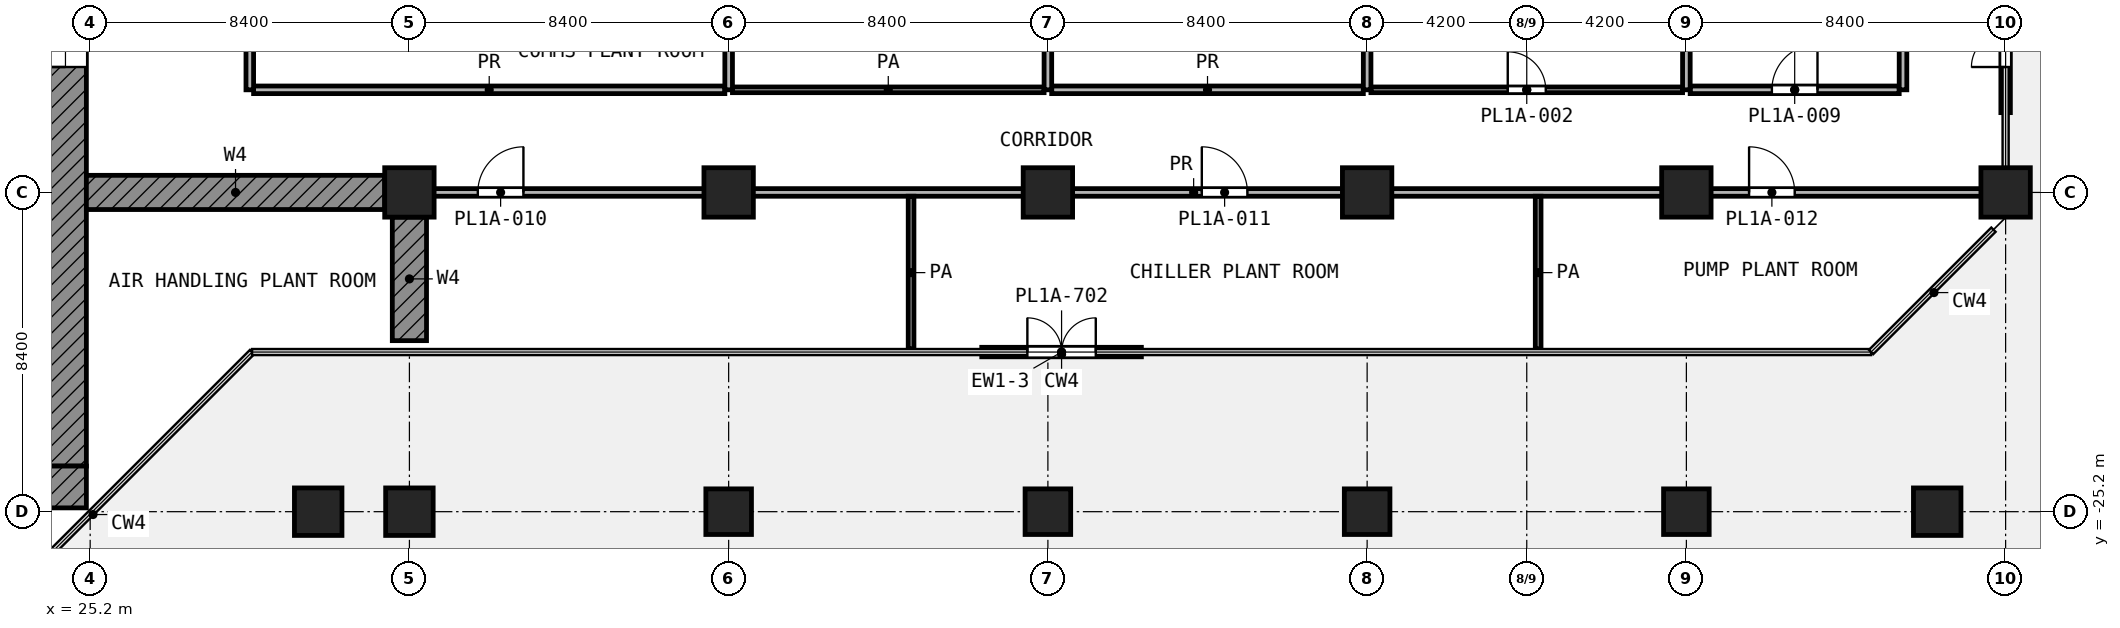
"""IFC4 building model, lengths in metres.
Left out: names, types, materials, properties, quantities, classifications, styles, units other than length and angle.
Written with IfcOpenShell. Run it as: python <this file> out.ifc"""

import sys

from ifc_helpers import new_model, si_unit, direction, frame, frame_2d, origin, origin_2d, place, context, subcontext, project, spatial, rectangle, extrude, element, fill, save


model = new_model("IFC4")
c1 = context("Model", 3, precision=1e-05, world=origin(), true_north=direction((0.0, 1.0)))
c2 = subcontext(c1, "Body", "Model", "MODEL_VIEW")
j1 = project(units=[si_unit("LENGTHUNIT", "METRE"), si_unit("PLANEANGLEUNIT", "RADIAN")], contexts=[c1])
p1 = place(None, origin())
s1 = spatial("IfcSite", under=j1, at=p1, CompositionType="ELEMENT")
p2 = place(p1, origin())
s2 = spatial("IfcBuilding", under=s1, at=p2, CompositionType="ELEMENT")
p3 = place(p2, frame((0.0, 0.0, 34.2)))
s3 = spatial("IfcBuildingStorey", under=s2, at=p3, CompositionType="ELEMENT", Elevation=34.2)
for number, where, z_axis, x_axis in (
    (1, (33.6, -16.8, 0.0), (0.0, 0.0, 1.0), (1.0, 0.0, 0.0)),
    (2, (42.0, -16.8, 0.0), (0.0, 0.0, 1.0), (1.0, 0.0, 0.0)),
    (3, (50.4, -16.8, 0.0), (0.0, 0.0, 1.0), (1.0, 0.0, 0.0)),
    (4, (58.8, -16.8, 0.0), (0.0, 0.0, 1.0), (1.0, 0.0, 0.0)),
    (5, (67.2, -16.8, 0.0), (0.0, 0.0, 1.0), (1.0, 0.0, 0.0)),
    (6, (75.6, -16.8, 0.0), (0.0, 0.0, 1.0), (1.0, 0.0, 0.0)),
):
    element("IfcColumn", number, at=place(p3, frame(where, z_axis=z_axis, x_axis=x_axis)), inside=s3, PredefinedType="COLUMN", context=c2, shape_type="SweptSolid", body=[
        extrude(rectangle(XDim=1.3, YDim=1.3, at=origin_2d()), origin(), (0.0, 0.0, 1.0), 5.0),
    ])
p4 = place(p3, frame((31.2, -25.2, 0.0), z_axis=(0.0, 0.0, 1.0), x_axis=(1.0, 0.0, 0.0)))
e7 = element("IfcColumn", 7, at=p4, inside=s3, PredefinedType="COLUMN", context=c2, shape_type="SweptSolid", body=[
    extrude(rectangle(XDim=1.25, YDim=1.25, at=origin_2d()), origin(), (0.0, 0.0, 1.0), 5.0),
])
for number, where, z_axis, x_axis in (
    (8, (42.0, -25.2, 0.0), (0.0, 0.0, 1.0), (1.0, 0.0, 0.0)),
    (9, (50.4, -25.2, 0.0), (0.0, 0.0, 1.0), (1.0, 0.0, 0.0)),
    (10, (58.8, -25.2, 0.0), (0.0, 0.0, 1.0), (1.0, 0.0, 0.0)),
    (11, (67.2, -25.2, 0.0), (0.0, 0.0, 1.0), (1.0, 0.0, 0.0)),
):
    element("IfcColumn", number, at=place(p3, frame(where, z_axis=z_axis, x_axis=x_axis)), inside=s3, PredefinedType="COLUMN", context=c2, shape_type="SweptSolid", body=[
        extrude(rectangle(XDim=1.2, YDim=1.2, at=origin_2d()), origin(), (0.0, 0.0, 1.0), 5.0),
    ])
for number, where, z_axis, x_axis in (
    (12, (73.8, -25.2, 0.0), (0.0, 0.0, 1.0), (1.0, 0.0, 0.0)),
    (13, (33.6, -25.2, 0.0), (0.0, 0.0, 1.0), (1.0, 0.0, 0.0)),
):
    element("IfcColumn", number, at=place(p3, frame(where, z_axis=z_axis, x_axis=x_axis)), inside=s3, PredefinedType="COLUMN", context=c2, shape_type="SweptSolid", body=[
        extrude(rectangle(XDim=1.25, YDim=1.25, at=origin_2d()), origin(), (0.0, 0.0, 1.0), 5.0),
    ])
p5 = place(p3, frame((25.1, -16.8, 0.0), z_axis=(0.0, 0.0, 1.0), x_axis=(1.0, 0.0, 0.0)))
e14 = element("IfcWall", 14, at=p5, inside=s3, PredefinedType="SHEAR", context=c2, shape_type="SweptSolid", body=[
    extrude(rectangle(XDim=7.85, YDim=0.9, at=frame_2d((3.925, 0.0))), origin(), (0.0, 0.0, 1.0), 4.58),
])
p6 = place(p3, frame((33.6, -17.45, 0.0), z_axis=(0.0, 0.0, 1.0), x_axis=(0.0, -1.0, 0.0)))
e15 = element("IfcWall", 15, at=p6, inside=s3, PredefinedType="SHEAR", context=c2, shape_type="SweptSolid", body=[
    extrude(rectangle(XDim=3.25, YDim=0.9, at=frame_2d((1.625, 0.0))), origin(), (0.0, 0.0, 1.0), 4.58),
])
p7 = place(p3, frame((48.66, -21.0, 0.0), z_axis=(0.0, 0.0, 1.0), x_axis=(1.0, 0.0, 0.0)))
e16 = element("IfcWall", 16, at=p7, inside=s3, PredefinedType="SOLIDWALL", context=c2, shape_type="SweptSolid", body=[
    extrude(rectangle(XDim=4.2, YDim=0.25, at=frame_2d((2.1, 0.0))), origin(), (0.0, 0.0, 1.0), 4.42),
])
p8 = place(p7, frame((1.2, 0.0, 0.0)))
e17 = element("IfcOpeningElement", 17, at=p8, cuts=e16, PredefinedType="OPENING", context=c2, shape_type="SweptSolid", body=[
    extrude(rectangle(XDim=1.8, YDim=2.1, at=frame_2d((0.9, 1.05))), frame((0.0, 0.135, 0.0), z_axis=(0.0, -1.0, 0.0), x_axis=(1.0, 0.0, 0.0)), (0.0, 0.0, 1.0), 0.27),
])
p9 = place(p3, frame((75.6, -14.7, 0.0), z_axis=(0.0, 0.0, 1.0), x_axis=(0.0, 1.0, 0.0)))
e18 = element("IfcWall", 18, at=p9, inside=s3, PredefinedType="SOLIDWALL", context=c2, shape_type="SweptSolid", body=[
    extrude(rectangle(XDim=4.2, YDim=0.25, at=frame_2d((2.1, 0.0))), origin(), (0.0, 0.0, 1.0), 4.42),
])
p10 = place(p9, frame((1.2, 0.0, 0.0)))
e19 = element("IfcOpeningElement", 19, at=p10, cuts=e18, PredefinedType="OPENING", context=c2, shape_type="SweptSolid", body=[
    extrude(rectangle(XDim=1.8, YDim=2.1, at=frame_2d((0.9, 1.05))), frame((0.0, 0.135, 0.0), z_axis=(0.0, -1.0, 0.0), x_axis=(1.0, 0.0, 0.0)), (0.0, 0.0, 1.0), 0.27),
])
p11 = place(p3, frame((24.55, -24.0, 0.0), z_axis=(0.0, 0.0, 1.0), x_axis=(0.0, 1.0, 0.0)))
e20 = element("IfcWall", 20, at=p11, inside=s3, PredefinedType="SHEAR", context=c2, shape_type="SweptSolid", body=[
    extrude(rectangle(XDim=18.6, YDim=1.1, at=frame_2d((9.3, 0.0))), origin(), (0.0, 0.0, 1.0), 4.58),
])
p12 = place(p11, frame((10.5, 0.0, 0.0)))
e21 = element("IfcOpeningElement", 21, at=p12, cuts=e20, PredefinedType="OPENING", context=c2, shape_type="SweptSolid", body=[
    extrude(rectangle(XDim=1.8, YDim=2.1, at=frame_2d((0.9, 1.05))), frame((0.0, 0.56, 0.0), z_axis=(0.0, -1.0, 0.0), x_axis=(1.0, 0.0, 0.0)), (0.0, 0.0, 1.0), 1.12),
])
p13 = place(p3, frame((24.55, -25.1, 0.0), z_axis=(0.0, 0.0, 1.0), x_axis=(0.0, 1.0, 0.0)))
e22 = element("IfcWall", 22, at=p13, inside=s3, PredefinedType="SHEAR", context=c2, shape_type="SweptSolid", body=[
    extrude(rectangle(XDim=1.1, YDim=1.1, at=frame_2d((0.55, 0.0))), origin(), (0.0, 0.0, 1.0), 4.58),
])
p14 = place(p3, frame((42.1, -14.1, 0.0), z_axis=(0.0, 0.0, 1.0), x_axis=(1.0, 0.0, 0.0)))
e23 = element("IfcWall", 23, at=p14, inside=s3, PredefinedType="PARTITIONING", context=c2, shape_type="SweptSolid", body=[
    extrude(rectangle(XDim=8.2, YDim=0.15, at=frame_2d((4.1, 0.0))), origin(), (0.0, 0.0, 1.0), 4.58),
])
p15 = place(p3, frame((58.9, -14.1, 0.0), z_axis=(0.0, 0.0, 1.0), x_axis=(1.0, 0.0, 0.0)))
e24 = element("IfcWall", 24, at=p15, inside=s3, PredefinedType="PARTITIONING", context=c2, shape_type="SweptSolid", body=[
    extrude(rectangle(XDim=8.2, YDim=0.15, at=frame_2d((4.1, 0.0))), origin(), (0.0, 0.0, 1.0), 4.58),
])
p16 = place(p15, frame((3.6, 0.0, 0.0)))
e25 = element("IfcOpeningElement", 25, at=p16, cuts=e24, PredefinedType="OPENING", context=c2, shape_type="SweptSolid", body=[
    extrude(rectangle(XDim=1.0, YDim=2.1, at=frame_2d((0.5, 1.05))), frame((0.0, 0.085, 0.0), z_axis=(0.0, -1.0, 0.0), x_axis=(1.0, 0.0, 0.0)), (0.0, 0.0, 1.0), 0.17),
])
for number, where, z_axis, x_axis in (
    (26, (46.8, -20.92, 0.0), (0.0, 0.0, 1.0), (0.0, 1.0, 0.0)),
    (27, (63.3, -20.92, 0.0), (0.0, 0.0, 1.0), (0.0, 1.0, 0.0)),
):
    element("IfcWall", number, at=place(p3, frame(where, z_axis=z_axis, x_axis=x_axis)), inside=s3, PredefinedType="PARTITIONING", context=c2, shape_type="SweptSolid", body=[
        extrude(rectangle(XDim=4.02, YDim=0.15, at=frame_2d((2.01, 0.0))), origin(), (0.0, 0.0, 1.0), 4.58),
    ])
p17 = place(p3, frame((32.95, -16.8, 0.0), z_axis=(0.0, 0.0, 1.0), x_axis=(1.0, 0.0, 0.0)))
e28 = element("IfcWall", 28, at=p17, inside=s3, PredefinedType="PARTITIONING", context=c2, shape_type="SweptSolid", body=[
    extrude(rectangle(XDim=42.57, YDim=0.2, at=frame_2d((21.285, 0.0))), origin(), (0.0, 0.0, 1.0), 4.58),
])
p18 = place(p17, frame((2.45, 0.0, 0.0)))
e29 = element("IfcOpeningElement", 29, at=p18, cuts=e28, PredefinedType="OPENING", context=c2, shape_type="SweptSolid", body=[
    extrude(rectangle(XDim=1.2, YDim=2.1, at=frame_2d((0.6, 1.05))), frame((0.0, 0.11, 0.0), z_axis=(0.0, -1.0, 0.0), x_axis=(1.0, 0.0, 0.0)), (0.0, 0.0, 1.0), 0.22),
])
p19 = place(p17, frame((21.5, 0.0, 0.0)))
e30 = element("IfcOpeningElement", 30, at=p19, cuts=e28, PredefinedType="OPENING", context=c2, shape_type="SweptSolid", body=[
    extrude(rectangle(XDim=1.2, YDim=2.1, at=frame_2d((0.6, 1.05))), frame((0.0, 0.11, 0.0), z_axis=(0.0, -1.0, 0.0), x_axis=(1.0, 0.0, 0.0)), (0.0, 0.0, 1.0), 0.22),
])
p20 = place(p17, frame((35.9, 0.0, 0.0)))
e31 = element("IfcOpeningElement", 31, at=p20, cuts=e28, PredefinedType="OPENING", context=c2, shape_type="SweptSolid", body=[
    extrude(rectangle(XDim=1.2, YDim=2.1, at=frame_2d((0.6, 1.05))), frame((0.0, 0.11, 0.0), z_axis=(0.0, -1.0, 0.0), x_axis=(1.0, 0.0, 0.0)), (0.0, 0.0, 1.0), 0.22),
])
p21 = place(p3, frame((29.5, -14.1, 0.0), z_axis=(0.0, 0.0, 1.0), x_axis=(1.0, 0.0, 0.0)))
e32 = element("IfcWall", 32, at=p21, inside=s3, PredefinedType="PARTITIONING", context=c2, shape_type="SweptSolid", body=[
    extrude(rectangle(XDim=12.4, YDim=0.2, at=frame_2d((6.2, 0.0))), origin(), (0.0, 0.0, 1.0), 4.58),
])
p22 = place(p3, frame((50.5, -14.1, 0.0), z_axis=(0.0, 0.0, 1.0), x_axis=(1.0, 0.0, 0.0)))
e33 = element("IfcWall", 33, at=p22, inside=s3, PredefinedType="PARTITIONING", context=c2, shape_type="SweptSolid", body=[
    extrude(rectangle(XDim=8.2, YDim=0.2, at=frame_2d((4.1, 0.0))), origin(), (0.0, 0.0, 1.0), 4.58),
])
p23 = place(p3, frame((67.3, -14.1, 0.0), z_axis=(0.0, 0.0, 1.0), x_axis=(1.0, 0.0, 0.0)))
e34 = element("IfcWall", 34, at=p23, inside=s3, PredefinedType="PARTITIONING", context=c2, shape_type="SweptSolid", body=[
    extrude(rectangle(XDim=5.5, YDim=0.2, at=frame_2d((2.75, 0.0))), origin(), (0.0, 0.0, 1.0), 4.58),
])
p24 = place(p23, frame((2.15, 0.0, 0.0)))
e35 = element("IfcOpeningElement", 35, at=p24, cuts=e34, PredefinedType="OPENING", context=c2, shape_type="SweptSolid", body=[
    extrude(rectangle(XDim=1.2, YDim=2.1, at=frame_2d((0.6, 1.05))), frame((0.0, 0.11, 0.0), z_axis=(0.0, -1.0, 0.0), x_axis=(1.0, 0.0, 0.0)), (0.0, 0.0, 1.0), 0.22),
])
p25 = place(p3, frame((29.4, -14.1, 0.0), z_axis=(0.0, 0.0, 1.0), x_axis=(0.0, 1.0, 0.0)))
e36 = element("IfcWall", 36, at=p25, inside=s3, PredefinedType="PARTITIONING", context=c2, shape_type="SweptSolid", body=[
    extrude(rectangle(XDim=2.997, YDim=0.2, at=frame_2d((1.499, 0.0))), origin(), (0.0, 0.0, 1.0), 4.58),
])
for number, where, z_axis, x_axis in (
    (37, (42.0, -14.1, 0.0), (0.0, 0.0, 1.0), (0.0, 1.0, 0.0)),
    (38, (50.4, -14.1, 0.0), (0.0, 0.0, 1.0), (0.0, 1.0, 0.0)),
    (39, (58.8, -14.1, 0.0), (0.0, 0.0, 1.0), (0.0, 1.0, 0.0)),
    (40, (67.2, -14.1, 0.0), (0.0, 0.0, 1.0), (0.0, 1.0, 0.0)),
):
    element("IfcWall", number, at=place(p3, frame(where, z_axis=z_axis, x_axis=x_axis)), inside=s3, PredefinedType="PARTITIONING", context=c2, shape_type="SweptSolid", body=[
        extrude(rectangle(XDim=3.0, YDim=0.2, at=frame_2d((1.5, 0.0))), origin(), (0.0, 0.0, 1.0), 4.58),
    ])
p26 = place(p3, frame((72.9, -14.1, 0.0), z_axis=(0.0, 0.0, 1.0), x_axis=(0.0, 1.0, 0.0)))
e41 = element("IfcWall", 41, at=p26, inside=s3, PredefinedType="PARTITIONING", context=c2, shape_type="SweptSolid", body=[
    extrude(rectangle(XDim=2.997, YDim=0.2, at=frame_2d((1.499, 0.0))), origin(), (0.0, 0.0, 1.0), 4.58),
])
p27 = place(p8, origin())
e42 = element("IfcDoor", 42, at=p27, inside=s3, OperationType="DOUBLE_DOOR_SINGLE_SWING", PredefinedType="DOOR", context=c2, shape_type="SweptSolid", body=[
    extrude(rectangle(XDim=1.8, YDim=2.1, at=frame_2d((0.9, 1.05))), frame((0.0, 0.025, 0.0), z_axis=(0.0, -1.0, 0.0), x_axis=(1.0, 0.0, 0.0)), (0.0, 0.0, 1.0), 0.05),
])
fill(e17, e42)
p28 = place(p10, origin())
e43 = element("IfcDoor", 43, at=p28, inside=s3, OperationType="DOUBLE_DOOR_SINGLE_SWING", PredefinedType="DOOR", context=c2, shape_type="SweptSolid", body=[
    extrude(rectangle(XDim=1.8, YDim=2.1, at=frame_2d((0.9, 1.05))), frame((0.0, 0.025, 0.0), z_axis=(0.0, -1.0, 0.0), x_axis=(1.0, 0.0, 0.0)), (0.0, 0.0, 1.0), 0.05),
])
fill(e19, e43)
p29 = place(p12, origin())
e44 = element("IfcDoor", 44, at=p29, inside=s3, OperationType="DOUBLE_DOOR_SINGLE_SWING", PredefinedType="DOOR", context=c2, shape_type="SweptSolid", body=[
    extrude(rectangle(XDim=1.8, YDim=2.1, at=frame_2d((0.9, 1.05))), frame((0.0, 0.025, 0.0), z_axis=(0.0, -1.0, 0.0), x_axis=(1.0, 0.0, 0.0)), (0.0, 0.0, 1.0), 0.05),
])
fill(e21, e44)
p30 = place(p16, origin())
e45 = element("IfcDoor", 45, at=p30, inside=s3, OperationType="SINGLE_SWING_LEFT", PredefinedType="DOOR", context=c2, shape_type="SweptSolid", body=[
    extrude(rectangle(XDim=1.0, YDim=2.1, at=frame_2d((0.5, 1.05))), frame((0.0, 0.025, 0.0), z_axis=(0.0, -1.0, 0.0), x_axis=(1.0, 0.0, 0.0)), (0.0, 0.0, 1.0), 0.05),
])
fill(e25, e45)
p31 = place(p24, origin())
e46 = element("IfcDoor", 46, at=p31, inside=s3, OperationType="SINGLE_SWING_RIGHT", PredefinedType="DOOR", context=c2, shape_type="SweptSolid", body=[
    extrude(rectangle(XDim=1.2, YDim=2.1, at=frame_2d((0.6, 1.05))), frame((0.0, 0.025, 0.0), z_axis=(0.0, -1.0, 0.0), x_axis=(1.0, 0.0, 0.0)), (0.0, 0.0, 1.0), 0.05),
])
fill(e35, e46)
p32 = place(p18, origin())
e47 = element("IfcDoor", 47, at=p32, inside=s3, OperationType="SINGLE_SWING_RIGHT", PredefinedType="DOOR", context=c2, shape_type="SweptSolid", body=[
    extrude(rectangle(XDim=1.2, YDim=2.1, at=frame_2d((0.6, 1.05))), frame((0.0, 0.025, 0.0), z_axis=(0.0, -1.0, 0.0), x_axis=(1.0, 0.0, 0.0)), (0.0, 0.0, 1.0), 0.05),
])
fill(e29, e47)
p33 = place(p19, origin())
e48 = element("IfcDoor", 48, at=p33, inside=s3, OperationType="SINGLE_SWING_LEFT", PredefinedType="DOOR", context=c2, shape_type="SweptSolid", body=[
    extrude(rectangle(XDim=1.2, YDim=2.1, at=frame_2d((0.6, 1.05))), frame((0.0, 0.025, 0.0), z_axis=(0.0, -1.0, 0.0), x_axis=(1.0, 0.0, 0.0)), (0.0, 0.0, 1.0), 0.05),
])
fill(e30, e48)
p34 = place(p20, origin())
e49 = element("IfcDoor", 49, at=p34, inside=s3, OperationType="SINGLE_SWING_LEFT", PredefinedType="DOOR", context=c2, shape_type="SweptSolid", body=[
    extrude(rectangle(XDim=1.2, YDim=2.1, at=frame_2d((0.6, 1.05))), frame((0.0, 0.025, 0.0), z_axis=(0.0, -1.0, 0.0), x_axis=(1.0, 0.0, 0.0)), (0.0, 0.0, 1.0), 0.05),
])
fill(e31, e49)
save(model, sys.argv[1])
